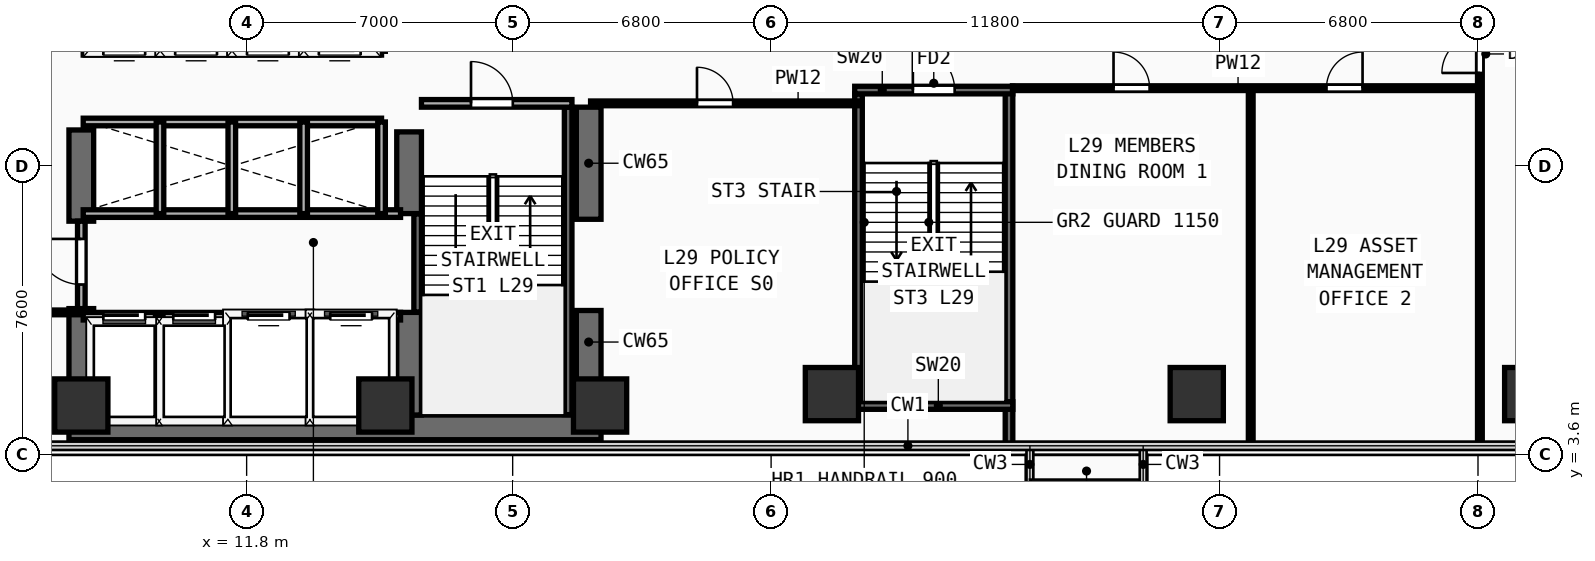
"""IFC4 building model, lengths in metres.
Left out: names, types, materials, properties, quantities, classifications, styles, units other than length and angle.
Written with IfcOpenShell. Run it as: python <this file> out.ifc"""

import sys

from ifc_helpers import new_model, si_unit, direction, frame, frame_2d, origin, origin_2d, place, context, subcontext, project, spatial, rectangle, extrude, element, fill, save


model = new_model("IFC4")
c1 = context("Model", 3, precision=1e-05, world=origin(), true_north=direction((0.0, 1.0)))
c2 = subcontext(c1, "Body", "Model", "MODEL_VIEW")
j1 = project(units=[si_unit("LENGTHUNIT", "METRE"), si_unit("PLANEANGLEUNIT", "RADIAN")], contexts=[c1])
p1 = place(None, origin())
s1 = spatial("IfcSite", under=j1, at=p1, CompositionType="ELEMENT")
p2 = place(p1, origin())
s2 = spatial("IfcBuilding", under=s1, at=p2, CompositionType="ELEMENT")
p3 = place(p2, frame((0.0, 0.0, 114.5)))
s3 = spatial("IfcBuildingStorey", under=s2, at=p3, CompositionType="ELEMENT", Elevation=114.5)
p4 = place(p3, frame((7.125, 4.325, 0.0), z_axis=(0.0, 0.0, 1.0), x_axis=(1.0, 0.0, 0.0)))
e1 = element("IfcWall", 1, at=p4, inside=s3, PredefinedType="SHEAR", context=c2, shape_type="SweptSolid", body=[
    extrude(rectangle(XDim=14.0, YDim=0.65, at=frame_2d((7.0, 0.0))), origin(), (0.0, 0.0, 1.0), 3.54),
])
p5 = place(p3, frame((7.45, 4.65, 0.0), z_axis=(0.0, 0.0, 1.0), x_axis=(0.0, 1.0, 0.0)))
e2 = element("IfcWall", 2, at=p5, inside=s3, PredefinedType="SHEAR", context=c2, shape_type="SweptSolid", body=[
    extrude(rectangle(XDim=2.8, YDim=0.65, at=frame_2d((1.4, 0.0))), origin(), (0.0, 0.0, 1.0), 3.54),
])
p6 = place(p3, frame((7.45, 9.75, 0.0), z_axis=(0.0, 0.0, 1.0), x_axis=(0.0, 1.0, 0.0)))
e3 = element("IfcWall", 3, at=p6, inside=s3, PredefinedType="SHEAR", context=c2, shape_type="SweptSolid", body=[
    extrude(rectangle(XDim=2.4, YDim=0.65, at=frame_2d((1.2, 0.0))), origin(), (0.0, 0.0, 1.0), 3.54),
])
p7 = place(p3, frame((20.8, 4.65, 0.0), z_axis=(0.0, 0.0, 1.0), x_axis=(0.0, 1.0, 0.0)))
e4 = element("IfcWall", 4, at=p7, inside=s3, PredefinedType="SHEAR", context=c2, shape_type="SweptSolid", body=[
    extrude(rectangle(XDim=2.75, YDim=0.65, at=frame_2d((1.375, 0.0))), origin(), (0.0, 0.0, 1.0), 3.54),
])
p8 = place(p3, frame((20.8, 9.8, 0.0), z_axis=(0.0, 0.0, 1.0), x_axis=(0.0, 1.0, 0.0)))
e5 = element("IfcWall", 5, at=p8, inside=s3, PredefinedType="SHEAR", context=c2, shape_type="SweptSolid", body=[
    extrude(rectangle(XDim=2.95, YDim=0.65, at=frame_2d((1.475, 0.0))), origin(), (0.0, 0.0, 1.0), 3.54),
])
p9 = place(p3, frame((16.075, 4.65, 0.0), z_axis=(0.0, 0.0, 1.0), x_axis=(0.0, 1.0, 0.0)))
e6 = element("IfcWall", 6, at=p9, inside=s3, PredefinedType="SHEAR", context=c2, shape_type="SweptSolid", body=[
    extrude(rectangle(XDim=2.7, YDim=0.65, at=frame_2d((1.35, 0.0))), origin(), (0.0, 0.0, 1.0), 3.54),
])
p10 = place(p3, frame((16.075, 9.95, 0.0), z_axis=(0.0, 0.0, 1.0), x_axis=(0.0, 1.0, 0.0)))
e7 = element("IfcWall", 7, at=p10, inside=s3, PredefinedType="SHEAR", context=c2, shape_type="SweptSolid", body=[
    extrude(rectangle(XDim=2.15, YDim=0.65, at=frame_2d((1.075, 0.0))), origin(), (0.0, 0.0, 1.0), 3.54),
])
for number, where, z_axis, x_axis in (
    (8, (7.45, 4.9, 0.0), (0.0, 0.0, 1.0), (1.0, 0.0, 0.0)),
    (9, (15.45, 4.9, 0.0), (0.0, 0.0, 1.0), (1.0, 0.0, 0.0)),
    (10, (21.1, 4.9, 0.0), (0.0, 0.0, 1.0), (1.0, 0.0, 0.0)),
    (11, (27.2, 5.2, 0.0), (0.0, 0.0, 1.0), (1.0, 0.0, 0.0)),
    (12, (36.8, 5.2, 0.0), (0.0, 0.0, 1.0), (1.0, 0.0, 0.0)),
    (13, (45.6, 5.2, 0.0), (0.0, 0.0, 1.0), (1.0, 0.0, 0.0)),
):
    element("IfcColumn", number, at=place(p3, frame(where, z_axis=z_axis, x_axis=x_axis)), inside=s3, PredefinedType="COLUMN", context=c2, shape_type="SweptSolid", body=[
        extrude(rectangle(XDim=1.4, YDim=1.4, at=origin_2d()), origin(), (0.0, 0.0, 1.0), 3.54),
    ])
p11 = place(p3, frame((16.3, 7.36, 0.0), z_axis=(0.0, 0.0, 1.0), x_axis=(0.0, 1.0, 0.0)))
e14 = element("IfcWall", 14, at=p11, inside=s3, PredefinedType="SHEAR", context=c2, shape_type="SweptSolid", body=[
    extrude(rectangle(XDim=2.58, YDim=0.2, at=frame_2d((1.29, 0.0))), origin(), (0.0, 0.0, 1.0), 3.54),
])
p12 = place(p3, frame((20.26, 4.66, 0.0), z_axis=(0.0, 0.0, 1.0), x_axis=(0.0, 1.0, 0.0)))
e15 = element("IfcWall", 15, at=p12, inside=s3, PredefinedType="SHEAR", context=c2, shape_type="SweptSolid", body=[
    extrude(rectangle(XDim=8.09, YDim=0.2, at=frame_2d((4.045, 0.0))), origin(), (0.0, 0.0, 1.0), 3.54),
])
p13 = place(p3, frame((16.4, 12.85, 0.0), z_axis=(0.0, 0.0, 1.0), x_axis=(1.0, 0.0, 0.0)))
e16 = element("IfcWall", 16, at=p13, inside=s3, PredefinedType="PARTITIONING", context=c2, shape_type="SweptSolid", body=[
    extrude(rectangle(XDim=3.96, YDim=0.2, at=frame_2d((1.98, 0.0))), origin(), (0.0, 0.0, 1.0), 3.54),
])
p14 = place(p13, frame((1.304, 0.0, 0.0)))
e17 = element("IfcOpeningElement", 17, at=p14, cuts=e16, PredefinedType="OPENING", context=c2, shape_type="SweptSolid", body=[
    extrude(rectangle(XDim=1.1, YDim=2.2, at=frame_2d((0.55, 1.1))), frame((0.0, 0.11, 0.0), z_axis=(0.0, -1.0, 0.0), x_axis=(1.0, 0.0, 0.0)), (0.0, 0.0, 1.0), 0.22),
])
p15 = place(p3, frame((27.9, 5.0, 0.0), z_axis=(0.0, 0.0, 1.0), x_axis=(0.0, 1.0, 0.0)))
e18 = element("IfcWall", 18, at=p15, inside=s3, PredefinedType="SHEAR", context=c2, shape_type="SweptSolid", body=[
    extrude(rectangle(XDim=8.1, YDim=0.2, at=frame_2d((4.05, 0.0))), origin(), (0.0, 0.0, 1.0), 3.54),
])
p16 = place(p3, frame((31.86, 3.84, 0.0), z_axis=(0.0, 0.0, 1.0), x_axis=(0.0, 1.0, 0.0)))
e19 = element("IfcWall", 19, at=p16, inside=s3, PredefinedType="SHEAR", context=c2, shape_type="SweptSolid", body=[
    extrude(rectangle(XDim=9.41, YDim=0.2, at=frame_2d((4.705, 0.0))), origin(), (0.0, 0.0, 1.0), 3.54),
])
p17 = place(p3, frame((27.8, 4.9, 0.0), z_axis=(0.0, 0.0, 1.0), x_axis=(1.0, 0.0, 0.0)))
e20 = element("IfcWall", 20, at=p17, inside=s3, PredefinedType="SHEAR", context=c2, shape_type="SweptSolid", body=[
    extrude(rectangle(XDim=4.16, YDim=0.2, at=frame_2d((2.08, 0.0))), origin(), (0.0, 0.0, 1.0), 3.54),
])
p18 = place(p3, frame((27.8, 13.2, 0.0), z_axis=(0.0, 0.0, 1.0), x_axis=(1.0, 0.0, 0.0)))
e21 = element("IfcWall", 21, at=p18, inside=s3, PredefinedType="SHEAR", context=c2, shape_type="SweptSolid", body=[
    extrude(rectangle(XDim=4.16, YDim=0.2, at=frame_2d((2.08, 0.0))), origin(), (0.0, 0.0, 1.0), 3.54),
])
p19 = place(p18, frame((1.53, 0.0, 0.0)))
e22 = element("IfcOpeningElement", 22, at=p19, cuts=e21, PredefinedType="OPENING", context=c2, shape_type="SweptSolid", body=[
    extrude(rectangle(XDim=1.1, YDim=2.2, at=frame_2d((0.55, 1.1))), frame((0.0, 0.11, 0.0), z_axis=(0.0, -1.0, 0.0), x_axis=(1.0, 0.0, 0.0)), (0.0, 0.0, 1.0), 0.22),
])
p20 = place(p3, frame((7.5, 7.25, 0.0), z_axis=(0.0, 0.0, 1.0), x_axis=(1.0, 0.0, 0.0)))
e23 = element("IfcWall", 23, at=p20, inside=s3, PredefinedType="PARTITIONING", context=c2, shape_type="SweptSolid", body=[
    extrude(rectangle(XDim=8.35, YDim=0.2, at=frame_2d((4.175, 0.0))), origin(), (0.0, 0.0, 1.0), 3.54),
])
p21 = place(p20, frame((0.53, 0.0, 0.0)))
e24 = element("IfcOpeningElement", 24, at=p21, cuts=e23, PredefinedType="OPENING", context=c2, shape_type="SweptSolid", body=[
    extrude(rectangle(XDim=1.1, YDim=2.2, at=frame_2d((0.55, 1.1))), frame((0.0, 0.11, 0.0), z_axis=(0.0, -1.0, 0.0), x_axis=(1.0, 0.0, 0.0)), (0.0, 0.0, 1.0), 0.22),
])
p22 = place(p20, frame((2.37, 0.0, 0.0)))
e25 = element("IfcOpeningElement", 25, at=p22, cuts=e23, PredefinedType="OPENING", context=c2, shape_type="SweptSolid", body=[
    extrude(rectangle(XDim=1.1, YDim=2.2, at=frame_2d((0.55, 1.1))), frame((0.0, 0.11, 0.0), z_axis=(0.0, -1.0, 0.0), x_axis=(1.0, 0.0, 0.0)), (0.0, 0.0, 1.0), 0.22),
])
p23 = place(p20, frame((4.33, 0.0, 0.0)))
e26 = element("IfcOpeningElement", 26, at=p23, cuts=e23, PredefinedType="OPENING", context=c2, shape_type="SweptSolid", body=[
    extrude(rectangle(XDim=1.1, YDim=2.2, at=frame_2d((0.55, 1.1))), frame((0.0, 0.11, 0.0), z_axis=(0.0, -1.0, 0.0), x_axis=(1.0, 0.0, 0.0)), (0.0, 0.0, 1.0), 0.22),
])
p24 = place(p20, frame((6.5, 0.0, 0.0)))
e27 = element("IfcOpeningElement", 27, at=p24, cuts=e23, PredefinedType="OPENING", context=c2, shape_type="SweptSolid", body=[
    extrude(rectangle(XDim=1.1, YDim=2.2, at=frame_2d((0.55, 1.1))), frame((0.0, 0.11, 0.0), z_axis=(0.0, -1.0, 0.0), x_axis=(1.0, 0.0, 0.0)), (0.0, 0.0, 1.0), 0.22),
])
p25 = place(p3, frame((7.5, 9.95, 0.0), z_axis=(0.0, 0.0, 1.0), x_axis=(1.0, 0.0, 0.0)))
e28 = element("IfcWall", 28, at=p25, inside=s3, PredefinedType="PARTITIONING", context=c2, shape_type="SweptSolid", body=[
    extrude(rectangle(XDim=8.35, YDim=0.2, at=frame_2d((4.175, 0.0))), origin(), (0.0, 0.0, 1.0), 3.54),
])
for number, where, z_axis, x_axis in (
    (29, (9.5, 4.45, 0.0), (0.0, 0.0, 1.0), (0.0, 1.0, 0.0)),
    (30, (11.36, 4.45, 0.0), (0.0, 0.0, 1.0), (0.0, 1.0, 0.0)),
    (31, (13.46, 4.45, 0.0), (0.0, 0.0, 1.0), (0.0, 1.0, 0.0)),
):
    element("IfcWall", number, at=place(p3, frame(where, z_axis=z_axis, x_axis=x_axis)), inside=s3, PredefinedType="PARTITIONING", context=c2, shape_type="SweptSolid", body=[
        extrude(rectangle(XDim=2.8, YDim=0.2, at=frame_2d((1.4, 0.0))), origin(), (0.0, 0.0, 1.0), 3.54),
    ])
p26 = place(p3, frame((7.45, 7.45, 0.0), z_axis=(0.0, 0.0, 1.0), x_axis=(0.0, 1.0, 0.0)))
e32 = element("IfcWall", 32, at=p26, inside=s3, PredefinedType="PARTITIONING", context=c2, shape_type="SweptSolid", body=[
    extrude(rectangle(XDim=2.3, YDim=0.2, at=frame_2d((1.15, 0.0))), origin(), (0.0, 0.0, 1.0), 2.52),
])
p27 = place(p26, frame((0.633, 0.0, 0.0)))
e33 = element("IfcOpeningElement", 33, at=p27, cuts=e32, PredefinedType="OPENING", context=c2, shape_type="SweptSolid", body=[
    extrude(rectangle(XDim=1.2, YDim=2.25, at=frame_2d((0.6, 1.125))), frame((0.0, 0.11, 0.0), z_axis=(0.0, -1.0, 0.0), x_axis=(1.0, 0.0, 0.0)), (0.0, 0.0, 1.0), 0.22),
])
p28 = place(p3, frame((7.5, 12.36, 0.0), z_axis=(0.0, 0.0, 1.0), x_axis=(1.0, 0.0, 0.0)))
e34 = element("IfcWall", 34, at=p28, inside=s3, PredefinedType="PARTITIONING", context=c2, shape_type="SweptSolid", body=[
    extrude(rectangle(XDim=7.85, YDim=0.2, at=frame_2d((3.925, 0.0))), origin(), (0.0, 0.0, 1.0), 3.54),
])
for number, where, z_axis, x_axis in (
    (35, (15.35, 9.95, 0.0), (0.0, 0.0, 1.0), (0.0, 1.0, 0.0)),
    (36, (9.52, 9.95, 0.0), (0.0, 0.0, 1.0), (0.0, 1.0, 0.0)),
    (37, (11.41, 9.95, 0.0), (0.0, 0.0, 1.0), (0.0, 1.0, 0.0)),
    (38, (13.3, 9.95, 0.0), (0.0, 0.0, 1.0), (0.0, 1.0, 0.0)),
):
    element("IfcWall", number, at=place(p3, frame(where, z_axis=z_axis, x_axis=x_axis)), inside=s3, PredefinedType="PARTITIONING", context=c2, shape_type="SweptSolid", body=[
        extrude(rectangle(XDim=2.41, YDim=0.2, at=frame_2d((1.205, 0.0))), origin(), (0.0, 0.0, 1.0), 3.54),
    ])
p29 = place(p3, frame((7.5, 14.22, 0.0), z_axis=(0.0, 0.0, 1.0), x_axis=(1.0, 0.0, 0.0)))
e39 = element("IfcWall", 39, at=p29, inside=s3, PredefinedType="PARTITIONING", context=c2, shape_type="SweptSolid", body=[
    extrude(rectangle(XDim=7.85, YDim=0.2, at=frame_2d((3.925, 0.0))), origin(), (0.0, 0.0, 1.0), 3.54),
])
p30 = place(p29, frame((0.53, 0.0, 0.0)))
e40 = element("IfcOpeningElement", 40, at=p30, cuts=e39, PredefinedType="OPENING", context=c2, shape_type="SweptSolid", body=[
    extrude(rectangle(XDim=1.1, YDim=2.2, at=frame_2d((0.55, 1.1))), frame((0.0, 0.11, 0.0), z_axis=(0.0, -1.0, 0.0), x_axis=(1.0, 0.0, 0.0)), (0.0, 0.0, 1.0), 0.22),
])
p31 = place(p29, frame((2.42, 0.0, 0.0)))
e41 = element("IfcOpeningElement", 41, at=p31, cuts=e39, PredefinedType="OPENING", context=c2, shape_type="SweptSolid", body=[
    extrude(rectangle(XDim=1.1, YDim=2.2, at=frame_2d((0.55, 1.1))), frame((0.0, 0.11, 0.0), z_axis=(0.0, -1.0, 0.0), x_axis=(1.0, 0.0, 0.0)), (0.0, 0.0, 1.0), 0.22),
])
p32 = place(p29, frame((4.31, 0.0, 0.0)))
e42 = element("IfcOpeningElement", 42, at=p32, cuts=e39, PredefinedType="OPENING", context=c2, shape_type="SweptSolid", body=[
    extrude(rectangle(XDim=1.1, YDim=2.2, at=frame_2d((0.55, 1.1))), frame((0.0, 0.11, 0.0), z_axis=(0.0, -1.0, 0.0), x_axis=(1.0, 0.0, 0.0)), (0.0, 0.0, 1.0), 0.22),
])
p33 = place(p29, frame((6.2, 0.0, 0.0)))
e43 = element("IfcOpeningElement", 43, at=p33, cuts=e39, PredefinedType="OPENING", context=c2, shape_type="SweptSolid", body=[
    extrude(rectangle(XDim=1.1, YDim=2.2, at=frame_2d((0.55, 1.1))), frame((0.0, 0.11, 0.0), z_axis=(0.0, -1.0, 0.0), x_axis=(1.0, 0.0, 0.0)), (0.0, 0.0, 1.0), 0.22),
])
p34 = place(p3, frame((1.64, 7.35, 0.0), z_axis=(0.0, 0.0, 1.0), x_axis=(1.0, 0.0, 0.0)))
e44 = element("IfcWall", 44, at=p34, inside=s3, PredefinedType="PARTITIONING", context=c2, shape_type="SweptSolid", body=[
    extrude(rectangle(XDim=5.76, YDim=0.125, at=frame_2d((2.88, 0.0))), origin(), (0.0, 0.0, 1.0), 3.54),
])
p35 = place(p34, frame((4.087, 0.0, 0.0)))
e45 = element("IfcOpeningElement", 45, at=p35, cuts=e44, PredefinedType="OPENING", context=c2, shape_type="SweptSolid", body=[
    extrude(rectangle(XDim=0.85, YDim=2.15, at=frame_2d((0.425, 1.075))), frame((0.0, 0.073, 0.0), z_axis=(0.0, -1.0, 0.0), x_axis=(1.0, 0.0, 0.0)), (0.0, 0.0, 1.0), 0.145),
])
p36 = place(p3, frame((20.85, 12.85, 0.0), z_axis=(0.0, 0.0, 1.0), x_axis=(1.0, 0.0, 0.0)))
e46 = element("IfcWall", 46, at=p36, inside=s3, PredefinedType="PARTITIONING", context=c2, shape_type="SweptSolid", body=[
    extrude(rectangle(XDim=7.05, YDim=0.125, at=frame_2d((3.525, 0.0))), origin(), (0.0, 0.0, 1.0), 3.54),
])
p37 = place(p36, frame((2.8, 0.0, 0.0)))
e47 = element("IfcOpeningElement", 47, at=p37, cuts=e46, PredefinedType="OPENING", context=c2, shape_type="SweptSolid", body=[
    extrude(rectangle(XDim=0.95, YDim=2.15, at=frame_2d((0.475, 1.075))), frame((0.0, 0.073, 0.0), z_axis=(0.0, -1.0, 0.0), x_axis=(1.0, 0.0, 0.0)), (0.0, 0.0, 1.0), 0.145),
])
p38 = place(p3, frame((31.95, 13.25, 0.0), z_axis=(0.0, 0.0, 1.0), x_axis=(1.0, 0.0, 0.0)))
e48 = element("IfcWall", 48, at=p38, inside=s3, PredefinedType="PARTITIONING", context=c2, shape_type="SweptSolid", body=[
    extrude(rectangle(XDim=12.3, YDim=0.125, at=frame_2d((6.15, 0.0))), origin(), (0.0, 0.0, 1.0), 3.09),
])
p39 = place(p38, frame((2.66, 0.0, 0.0)))
e49 = element("IfcOpeningElement", 49, at=p39, cuts=e48, PredefinedType="OPENING", context=c2, shape_type="SweptSolid", body=[
    extrude(rectangle(XDim=0.95, YDim=2.15, at=frame_2d((0.475, 1.075))), frame((0.0, 0.073, 0.0), z_axis=(0.0, -1.0, 0.0), x_axis=(1.0, 0.0, 0.0)), (0.0, 0.0, 1.0), 0.145),
])
p40 = place(p38, frame((8.263, 0.0, 0.0)))
e50 = element("IfcOpeningElement", 50, at=p40, cuts=e48, PredefinedType="OPENING", context=c2, shape_type="SweptSolid", body=[
    extrude(rectangle(XDim=0.95, YDim=2.15, at=frame_2d((0.475, 1.075))), frame((0.0, 0.073, 0.0), z_axis=(0.0, -1.0, 0.0), x_axis=(1.0, 0.0, 0.0)), (0.0, 0.0, 1.0), 0.145),
])
p41 = place(p3, frame((38.22, 3.84, 0.0), z_axis=(0.0, 0.0, 1.0), x_axis=(0.0, 1.0, 0.0)))
e51 = element("IfcWall", 51, at=p41, inside=s3, PredefinedType="PARTITIONING", context=c2, shape_type="SweptSolid", body=[
    extrude(rectangle(XDim=9.41, YDim=0.125, at=frame_2d((4.705, 0.0))), origin(), (0.0, 0.0, 1.0), 3.54),
])
p42 = place(p3, frame((44.25, 3.84, 0.0), z_axis=(0.0, 0.0, 1.0), x_axis=(0.0, 1.0, 0.0)))
e52 = element("IfcWall", 52, at=p42, inside=s3, PredefinedType="PARTITIONING", context=c2, shape_type="SweptSolid", body=[
    extrude(rectangle(XDim=20.12, YDim=0.125, at=frame_2d((10.06, 0.0))), origin(), (0.0, 0.0, 1.0), 3.54),
])
p43 = place(p42, frame((9.81, 0.0, 0.0)))
e53 = element("IfcOpeningElement", 53, at=p43, cuts=e52, PredefinedType="OPENING", context=c2, shape_type="SweptSolid", body=[
    extrude(rectangle(XDim=1.0, YDim=2.2, at=frame_2d((0.5, 1.1))), frame((0.0, 0.073, 0.0), z_axis=(0.0, -1.0, 0.0), x_axis=(1.0, 0.0, 0.0)), (0.0, 0.0, 1.0), 0.145),
])
p44 = place(p14, frame((1.1, 0.0, 0.0), z_axis=(0.0, 0.0, 1.0), x_axis=(-1.0, 0.0, 0.0)))
e54 = element("IfcDoor", 54, at=p44, inside=s3, OperationType="SINGLE_SWING_RIGHT", PredefinedType="DOOR", context=c2, shape_type="SweptSolid", body=[
    extrude(rectangle(XDim=1.1, YDim=2.2, at=frame_2d((0.55, 1.1))), frame((0.0, 0.025, 0.0), z_axis=(0.0, -1.0, 0.0), x_axis=(1.0, 0.0, 0.0)), (0.0, 0.0, 1.0), 0.05),
])
fill(e17, e54)
p45 = place(p19, frame((1.1, 0.0, 0.0), z_axis=(0.0, 0.0, 1.0), x_axis=(-1.0, 0.0, 0.0)))
e55 = element("IfcDoor", 55, at=p45, inside=s3, OperationType="SINGLE_SWING_RIGHT", PredefinedType="DOOR", context=c2, shape_type="SweptSolid", body=[
    extrude(rectangle(XDim=1.1, YDim=2.2, at=frame_2d((0.55, 1.1))), frame((0.0, 0.025, 0.0), z_axis=(0.0, -1.0, 0.0), x_axis=(1.0, 0.0, 0.0)), (0.0, 0.0, 1.0), 0.05),
])
fill(e22, e55)
p46 = place(p21, origin())
e56 = element("IfcDoor", 56, at=p46, inside=s3, OperationType="SLIDING_TO_LEFT", PredefinedType="DOOR", context=c2, shape_type="SweptSolid", body=[
    extrude(rectangle(XDim=1.1, YDim=2.2, at=frame_2d((0.55, 1.1))), frame((0.0, 0.025, 0.0), z_axis=(0.0, -1.0, 0.0), x_axis=(1.0, 0.0, 0.0)), (0.0, 0.0, 1.0), 0.05),
])
fill(e24, e56)
p47 = place(p22, origin())
e57 = element("IfcDoor", 57, at=p47, inside=s3, OperationType="SLIDING_TO_LEFT", PredefinedType="DOOR", context=c2, shape_type="SweptSolid", body=[
    extrude(rectangle(XDim=1.1, YDim=2.2, at=frame_2d((0.55, 1.1))), frame((0.0, 0.025, 0.0), z_axis=(0.0, -1.0, 0.0), x_axis=(1.0, 0.0, 0.0)), (0.0, 0.0, 1.0), 0.05),
])
fill(e25, e57)
p48 = place(p23, origin())
e58 = element("IfcDoor", 58, at=p48, inside=s3, OperationType="SLIDING_TO_LEFT", PredefinedType="DOOR", context=c2, shape_type="SweptSolid", body=[
    extrude(rectangle(XDim=1.1, YDim=2.2, at=frame_2d((0.55, 1.1))), frame((0.0, 0.025, 0.0), z_axis=(0.0, -1.0, 0.0), x_axis=(1.0, 0.0, 0.0)), (0.0, 0.0, 1.0), 0.05),
])
fill(e26, e58)
p49 = place(p24, origin())
e59 = element("IfcDoor", 59, at=p49, inside=s3, OperationType="SLIDING_TO_LEFT", PredefinedType="DOOR", context=c2, shape_type="SweptSolid", body=[
    extrude(rectangle(XDim=1.1, YDim=2.2, at=frame_2d((0.55, 1.1))), frame((0.0, 0.025, 0.0), z_axis=(0.0, -1.0, 0.0), x_axis=(1.0, 0.0, 0.0)), (0.0, 0.0, 1.0), 0.05),
])
fill(e27, e59)
p50 = place(p27, frame((1.2, 0.0, 0.0), z_axis=(0.0, 0.0, 1.0), x_axis=(-1.0, 0.0, 0.0)))
e60 = element("IfcDoor", 60, at=p50, inside=s3, OperationType="SINGLE_SWING_LEFT", PredefinedType="DOOR", context=c2, shape_type="SweptSolid", body=[
    extrude(rectangle(XDim=1.2, YDim=2.25, at=frame_2d((0.6, 1.125))), frame((0.0, 0.025, 0.0), z_axis=(0.0, -1.0, 0.0), x_axis=(1.0, 0.0, 0.0)), (0.0, 0.0, 1.0), 0.05),
])
fill(e33, e60)
p51 = place(p37, origin())
e61 = element("IfcDoor", 61, at=p51, inside=s3, OperationType="SINGLE_SWING_LEFT", PredefinedType="DOOR", context=c2, shape_type="SweptSolid", body=[
    extrude(rectangle(XDim=0.95, YDim=2.15, at=frame_2d((0.475, 1.075))), frame((0.0, 0.025, 0.0), z_axis=(0.0, -1.0, 0.0), x_axis=(1.0, 0.0, 0.0)), (0.0, 0.0, 1.0), 0.05),
])
fill(e47, e61)
p52 = place(p39, origin())
e62 = element("IfcDoor", 62, at=p52, inside=s3, OperationType="SINGLE_SWING_LEFT", PredefinedType="DOOR", context=c2, shape_type="SweptSolid", body=[
    extrude(rectangle(XDim=0.95, YDim=2.15, at=frame_2d((0.475, 1.075))), frame((0.0, 0.025, 0.0), z_axis=(0.0, -1.0, 0.0), x_axis=(1.0, 0.0, 0.0)), (0.0, 0.0, 1.0), 0.05),
])
fill(e49, e62)
p53 = place(p40, origin())
e63 = element("IfcDoor", 63, at=p53, inside=s3, OperationType="SINGLE_SWING_RIGHT", PredefinedType="DOOR", context=c2, shape_type="SweptSolid", body=[
    extrude(rectangle(XDim=0.95, YDim=2.15, at=frame_2d((0.475, 1.075))), frame((0.0, 0.025, 0.0), z_axis=(0.0, -1.0, 0.0), x_axis=(1.0, 0.0, 0.0)), (0.0, 0.0, 1.0), 0.05),
])
fill(e50, e63)
p54 = place(p43, origin())
e64 = element("IfcDoor", 64, at=p54, inside=s3, OperationType="SINGLE_SWING_LEFT", PredefinedType="DOOR", context=c2, shape_type="SweptSolid", body=[
    extrude(rectangle(XDim=1.0, YDim=2.2, at=frame_2d((0.5, 1.1))), frame((0.0, 0.025, 0.0), z_axis=(0.0, -1.0, 0.0), x_axis=(1.0, 0.0, 0.0)), (0.0, 0.0, 1.0), 0.05),
])
fill(e53, e64)
save(model, sys.argv[1])
